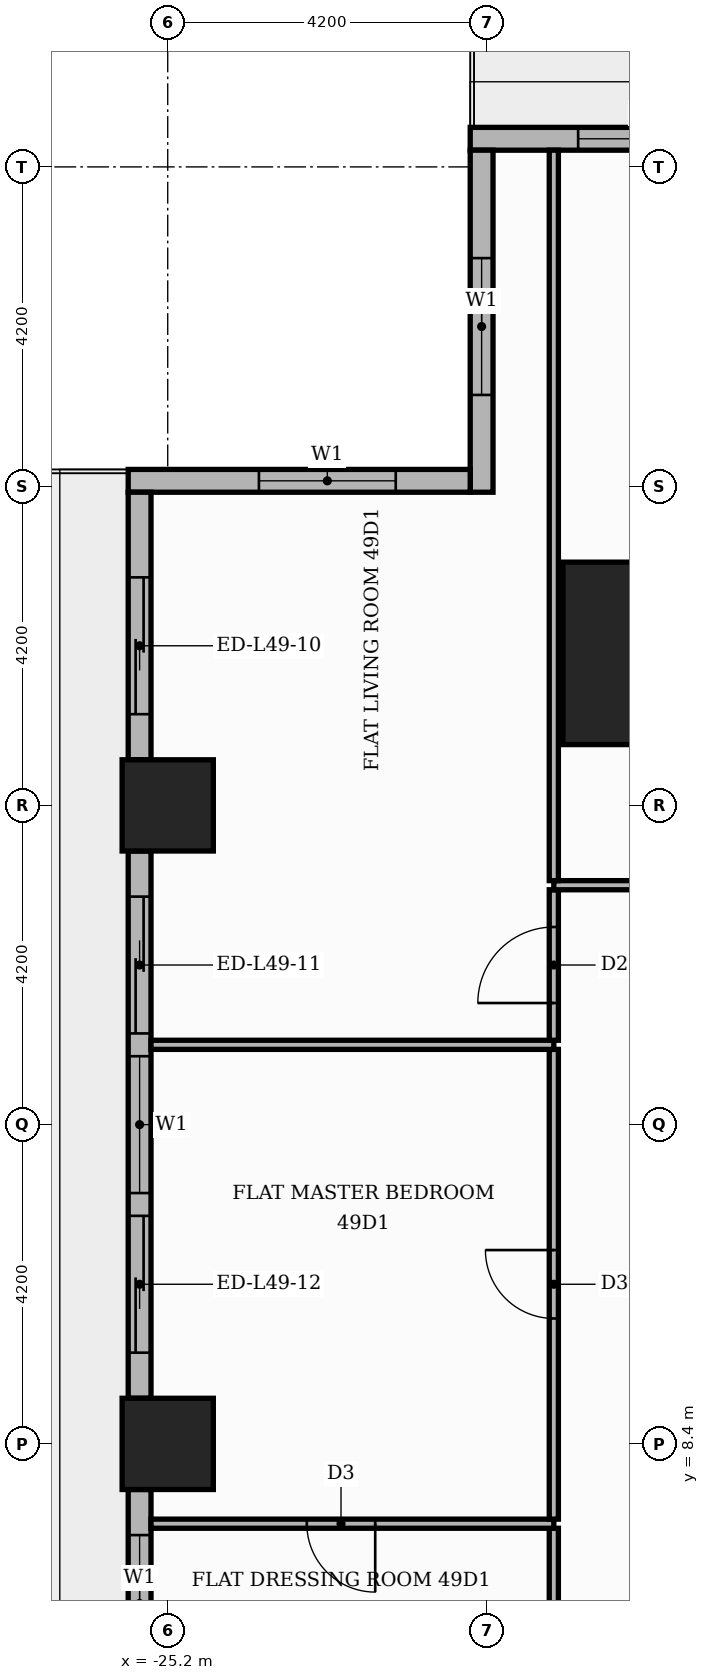
"""IFC4 building model, lengths in metres.
Left out: names, types, materials, properties, quantities, classifications, styles, units other than length and angle.
Written with IfcOpenShell. Run it as: python <this file> out.ifc"""

import sys

from ifc_helpers import new_model, si_unit, direction, frame, frame_2d, origin, origin_2d, place, context, subcontext, project, spatial, rectangle, extrude, element, fill, save


model = new_model("IFC4")
c1 = context("Model", 3, precision=1e-05, world=origin(), true_north=direction((0.0, 1.0)))
c2 = subcontext(c1, "Body", "Model", "MODEL_VIEW")
j1 = project(units=[si_unit("LENGTHUNIT", "METRE"), si_unit("PLANEANGLEUNIT", "RADIAN")], contexts=[c1])
p1 = place(None, origin())
s1 = spatial("IfcSite", under=j1, at=p1, CompositionType="ELEMENT")
p2 = place(p1, origin())
s2 = spatial("IfcBuilding", under=s1, at=p2, CompositionType="ELEMENT")
p3 = place(p2, frame((0.0, 0.0, 207.9)))
s3 = spatial("IfcBuildingStorey", under=s2, at=p3, CompositionType="ELEMENT", Elevation=207.9)
p4 = place(p3, frame((-18.8, 18.8, 0.0), z_axis=(0.0, 0.0, 1.0), x_axis=(1.0, 0.0, 0.0)))
e1 = element("IfcColumn", 1, at=p4, inside=s3, PredefinedType="COLUMN", context=c2, shape_type="SweptSolid", body=[
    extrude(rectangle(XDim=2.4, YDim=2.4, at=origin_2d()), origin(), (0.0, 0.0, 1.0), 3.9),
])
for number, where, z_axis, x_axis in (
    (2, (-25.2, 8.4, 0.0), (0.0, 0.0, 1.0), (1.0, 0.0, 0.0)),
    (3, (-25.2, 16.8, 0.0), (0.0, 0.0, 1.0), (1.0, 0.0, 0.0)),
):
    element("IfcColumn", number, at=place(p3, frame(where, z_axis=z_axis, x_axis=x_axis)), inside=s3, PredefinedType="COLUMN", context=c2, shape_type="SweptSolid", body=[
        extrude(rectangle(XDim=1.2, YDim=1.2, at=origin_2d()), origin(), (0.0, 0.0, 1.0), 3.9),
    ])
p5 = place(p3, frame((-17.4, 25.57, 0.0), z_axis=(0.0, 0.0, 1.0), x_axis=(-1.0, 0.0, 0.0)))
e4 = element("IfcWall", 4, at=p5, inside=s3, PredefinedType="STANDARD", context=c2, shape_type="SweptSolid", body=[
    extrude(rectangle(XDim=3.82, YDim=0.3, at=frame_2d((1.91, 0.0))), origin(), (0.0, 0.0, 1.0), 3.48),
])
p6 = place(p5, frame((0.6, 0.0, 0.9)))
e5 = element("IfcOpeningElement", 5, at=p6, cuts=e4, PredefinedType="OPENING", context=c2, shape_type="SweptSolid", body=[
    extrude(rectangle(XDim=1.8, YDim=2.1, at=frame_2d((0.9, 1.05))), frame((0.0, 0.16, 0.0), z_axis=(0.0, -1.0, 0.0), x_axis=(1.0, 0.0, 0.0)), (0.0, 0.0, 1.0), 0.32),
])
p7 = place(p3, frame((-21.07, 25.42, 0.0), z_axis=(0.0, 0.0, 1.0), x_axis=(0.0, -1.0, 0.0)))
e6 = element("IfcWall", 6, at=p7, inside=s3, PredefinedType="STANDARD", context=c2, shape_type="SweptSolid", body=[
    extrude(rectangle(XDim=4.5, YDim=0.3, at=frame_2d((2.25, 0.0))), origin(), (0.0, 0.0, 1.0), 3.48),
])
p8 = place(p7, frame((1.42, 0.0, 0.9)))
e7 = element("IfcOpeningElement", 7, at=p8, cuts=e6, PredefinedType="OPENING", context=c2, shape_type="SweptSolid", body=[
    extrude(rectangle(XDim=1.8, YDim=2.1, at=frame_2d((0.9, 1.05))), frame((0.0, 0.16, 0.0), z_axis=(0.0, -1.0, 0.0), x_axis=(1.0, 0.0, 0.0)), (0.0, 0.0, 1.0), 0.32),
])
p9 = place(p3, frame((-21.22, 21.07, 0.0), z_axis=(0.0, 0.0, 1.0), x_axis=(-1.0, 0.0, 0.0)))
e8 = element("IfcWall", 8, at=p9, inside=s3, PredefinedType="STANDARD", context=c2, shape_type="SweptSolid", body=[
    extrude(rectangle(XDim=4.5, YDim=0.3, at=frame_2d((2.25, 0.0))), origin(), (0.0, 0.0, 1.0), 3.48),
])
p10 = place(p9, frame((0.98, 0.0, 0.9)))
e9 = element("IfcOpeningElement", 9, at=p10, cuts=e8, PredefinedType="OPENING", context=c2, shape_type="SweptSolid", body=[
    extrude(rectangle(XDim=1.8, YDim=2.1, at=frame_2d((0.9, 1.05))), frame((0.0, 0.16, 0.0), z_axis=(0.0, -1.0, 0.0), x_axis=(1.0, 0.0, 0.0)), (0.0, 0.0, 1.0), 0.32),
])
p11 = place(p3, frame((-25.57, 20.92, 0.0), z_axis=(0.0, 0.0, 1.0), x_axis=(0.0, -1.0, 0.0)))
e10 = element("IfcWall", 10, at=p11, inside=s3, PredefinedType="STANDARD", context=c2, shape_type="SweptSolid", body=[
    extrude(rectangle(XDim=3.52, YDim=0.3, at=frame_2d((1.76, 0.0))), origin(), (0.0, 0.0, 1.0), 3.48),
])
p12 = place(p11, frame((1.12, 0.0, 0.0)))
e11 = element("IfcOpeningElement", 11, at=p12, cuts=e10, PredefinedType="OPENING", context=c2, shape_type="SweptSolid", body=[
    extrude(rectangle(XDim=1.8, YDim=2.4, at=frame_2d((0.9, 1.2))), frame((0.0, 0.16, 0.0), z_axis=(0.0, -1.0, 0.0), x_axis=(1.0, 0.0, 0.0)), (0.0, 0.0, 1.0), 0.32),
])
p13 = place(p3, frame((-25.57, 16.2, 0.0), z_axis=(0.0, 0.0, 1.0), x_axis=(0.0, -1.0, 0.0)))
e12 = element("IfcWall", 12, at=p13, inside=s3, PredefinedType="STANDARD", context=c2, shape_type="SweptSolid", body=[
    extrude(rectangle(XDim=7.2, YDim=0.3, at=frame_2d((3.6, 0.0))), origin(), (0.0, 0.0, 1.0), 3.48),
])
p14 = place(p13, frame((0.6, 0.0, 0.0)))
e13 = element("IfcOpeningElement", 13, at=p14, cuts=e12, PredefinedType="OPENING", context=c2, shape_type="SweptSolid", body=[
    extrude(rectangle(XDim=1.8, YDim=2.4, at=frame_2d((0.9, 1.2))), frame((0.0, 0.16, 0.0), z_axis=(0.0, -1.0, 0.0), x_axis=(1.0, 0.0, 0.0)), (0.0, 0.0, 1.0), 0.32),
])
p15 = place(p13, frame((2.7, 0.0, 0.9)))
e14 = element("IfcOpeningElement", 14, at=p15, cuts=e12, PredefinedType="OPENING", context=c2, shape_type="SweptSolid", body=[
    extrude(rectangle(XDim=1.8, YDim=2.1, at=frame_2d((0.9, 1.05))), frame((0.0, 0.16, 0.0), z_axis=(0.0, -1.0, 0.0), x_axis=(1.0, 0.0, 0.0)), (0.0, 0.0, 1.0), 0.32),
])
p16 = place(p13, frame((4.8, 0.0, 0.0)))
e15 = element("IfcOpeningElement", 15, at=p16, cuts=e12, PredefinedType="OPENING", context=c2, shape_type="SweptSolid", body=[
    extrude(rectangle(XDim=1.8, YDim=2.4, at=frame_2d((0.9, 1.2))), frame((0.0, 0.16, 0.0), z_axis=(0.0, -1.0, 0.0), x_axis=(1.0, 0.0, 0.0)), (0.0, 0.0, 1.0), 0.32),
])
p17 = place(p3, frame((-25.57, 7.8, 0.0), z_axis=(0.0, 0.0, 1.0), x_axis=(0.0, -1.0, 0.0)))
e16 = element("IfcWall", 16, at=p17, inside=s3, PredefinedType="STANDARD", context=c2, shape_type="SweptSolid", body=[
    extrude(rectangle(XDim=7.2, YDim=0.3, at=frame_2d((3.6, 0.0))), origin(), (0.0, 0.0, 1.0), 3.48),
])
p18 = place(p17, frame((0.6, 0.0, 0.9)))
e17 = element("IfcOpeningElement", 17, at=p18, cuts=e16, PredefinedType="OPENING", context=c2, shape_type="SweptSolid", body=[
    extrude(rectangle(XDim=1.8, YDim=2.1, at=frame_2d((0.9, 1.05))), frame((0.0, 0.16, 0.0), z_axis=(0.0, -1.0, 0.0), x_axis=(1.0, 0.0, 0.0)), (0.0, 0.0, 1.0), 0.32),
])
p19 = place(p17, frame((2.7, 0.0, 0.9)))
e18 = element("IfcOpeningElement", 18, at=p19, cuts=e16, PredefinedType="OPENING", context=c2, shape_type="SweptSolid", body=[
    extrude(rectangle(XDim=1.8, YDim=2.1, at=frame_2d((0.9, 1.05))), frame((0.0, 0.16, 0.0), z_axis=(0.0, -1.0, 0.0), x_axis=(1.0, 0.0, 0.0)), (0.0, 0.0, 1.0), 0.32),
])
p20 = place(p17, frame((4.8, 0.0, 0.9)))
e19 = element("IfcOpeningElement", 19, at=p20, cuts=e16, PredefinedType="OPENING", context=c2, shape_type="SweptSolid", body=[
    extrude(rectangle(XDim=1.8, YDim=2.1, at=frame_2d((0.9, 1.05))), frame((0.0, 0.16, 0.0), z_axis=(0.0, -1.0, 0.0), x_axis=(1.0, 0.0, 0.0)), (0.0, 0.0, 1.0), 0.32),
])
p21 = place(p3, frame((-20.12, 5.31, 0.0), z_axis=(0.0, 0.0, 1.0), x_axis=(0.0, 1.0, 0.0)))
e20 = element("IfcWall", 20, at=p21, inside=s3, PredefinedType="PARTITIONING", context=c2, shape_type="SweptSolid", body=[
    extrude(rectangle(XDim=1.98, YDim=0.12, at=frame_2d((0.99, 0.0))), origin(), (0.0, 0.0, 1.0), 3.48),
])
p22 = place(p3, frame((-25.42, 7.35, 0.0), z_axis=(0.0, 0.0, 1.0), x_axis=(1.0, 0.0, 0.0)))
e21 = element("IfcWall", 21, at=p22, inside=s3, PredefinedType="PARTITIONING", context=c2, shape_type="SweptSolid", body=[
    extrude(rectangle(XDim=5.3, YDim=0.12, at=frame_2d((2.65, 0.0))), origin(), (0.0, 0.0, 1.0), 3.48),
])
p23 = place(p22, frame((2.05, 0.0, 0.0)))
e22 = element("IfcOpeningElement", 22, at=p23, cuts=e21, PredefinedType="OPENING", context=c2, shape_type="SweptSolid", body=[
    extrude(rectangle(XDim=0.9, YDim=2.1, at=frame_2d((0.45, 1.05))), frame((0.0, 0.07, 0.0), z_axis=(0.0, -1.0, 0.0), x_axis=(1.0, 0.0, 0.0)), (0.0, 0.0, 1.0), 0.14),
])
p24 = place(p3, frame((-20.12, 7.41, 0.0), z_axis=(0.0, 0.0, 1.0), x_axis=(0.0, 1.0, 0.0)))
e23 = element("IfcWall", 23, at=p24, inside=s3, PredefinedType="PARTITIONING", context=c2, shape_type="SweptSolid", body=[
    extrude(rectangle(XDim=6.18, YDim=0.12, at=frame_2d((3.09, 0.0))), origin(), (0.0, 0.0, 1.0), 3.48),
])
p25 = place(p24, frame((2.64, 0.0, 0.0)))
e24 = element("IfcOpeningElement", 24, at=p25, cuts=e23, PredefinedType="OPENING", context=c2, shape_type="SweptSolid", body=[
    extrude(rectangle(XDim=0.9, YDim=2.1, at=frame_2d((0.45, 1.05))), frame((0.0, 0.07, 0.0), z_axis=(0.0, -1.0, 0.0), x_axis=(1.0, 0.0, 0.0)), (0.0, 0.0, 1.0), 0.14),
])
p26 = place(p3, frame((-25.42, 13.65, 0.0), z_axis=(0.0, 0.0, 1.0), x_axis=(1.0, 0.0, 0.0)))
e25 = element("IfcWall", 25, at=p26, inside=s3, PredefinedType="PARTITIONING", context=c2, shape_type="SweptSolid", body=[
    extrude(rectangle(XDim=5.3, YDim=0.12, at=frame_2d((2.65, 0.0))), origin(), (0.0, 0.0, 1.0), 3.48),
])
p27 = place(p3, frame((-20.12, 13.71, 0.0), z_axis=(0.0, 0.0, 1.0), x_axis=(0.0, 1.0, 0.0)))
e26 = element("IfcWall", 26, at=p27, inside=s3, PredefinedType="PARTITIONING", context=c2, shape_type="SweptSolid", body=[
    extrude(rectangle(XDim=1.98, YDim=0.12, at=frame_2d((0.99, 0.0))), origin(), (0.0, 0.0, 1.0), 3.48),
])
p28 = place(p27, frame((0.49, 0.0, 0.0)))
e27 = element("IfcOpeningElement", 27, at=p28, cuts=e26, PredefinedType="OPENING", context=c2, shape_type="SweptSolid", body=[
    extrude(rectangle(XDim=1.0, YDim=2.1, at=frame_2d((0.5, 1.05))), frame((0.0, 0.07, 0.0), z_axis=(0.0, -1.0, 0.0), x_axis=(1.0, 0.0, 0.0)), (0.0, 0.0, 1.0), 0.14),
])
p29 = place(p3, frame((-20.12, 15.75, 0.0), z_axis=(0.0, 0.0, 1.0), x_axis=(1.0, 0.0, 0.0)))
e28 = element("IfcWall", 28, at=p29, inside=s3, PredefinedType="PARTITIONING", context=c2, shape_type="SweptSolid", body=[
    extrude(rectangle(XDim=6.37, YDim=0.12, at=frame_2d((3.185, 0.0))), origin(), (0.0, 0.0, 1.0), 3.48),
])
p30 = place(p29, frame((2.785, 0.0, 0.0)))
e29 = element("IfcOpeningElement", 29, at=p30, cuts=e28, PredefinedType="OPENING", context=c2, shape_type="SweptSolid", body=[
    extrude(rectangle(XDim=0.9, YDim=2.1, at=frame_2d((0.45, 1.05))), frame((0.0, 0.07, 0.0), z_axis=(0.0, -1.0, 0.0), x_axis=(1.0, 0.0, 0.0)), (0.0, 0.0, 1.0), 0.14),
])
p31 = place(p3, frame((-20.12, 15.81, 0.0), z_axis=(0.0, 0.0, 1.0), x_axis=(0.0, 1.0, 0.0)))
e30 = element("IfcWall", 30, at=p31, inside=s3, PredefinedType="PARTITIONING", context=c2, shape_type="SweptSolid", body=[
    extrude(rectangle(XDim=9.61, YDim=0.12, at=frame_2d((4.805, 0.0))), origin(), (0.0, 0.0, 1.0), 3.48),
])
p32 = place(p6, origin())
e31 = element("IfcWindow", 31, at=p32, inside=s3, PartitioningType="SINGLE_PANEL", PredefinedType="WINDOW", context=c2, shape_type="SweptSolid", body=[
    extrude(rectangle(XDim=1.8, YDim=2.1, at=frame_2d((0.9, 1.05))), frame((0.0, 0.03, 0.0), z_axis=(0.0, -1.0, 0.0), x_axis=(1.0, 0.0, 0.0)), (0.0, 0.0, 1.0), 0.06),
])
fill(e5, e31)
p33 = place(p8, origin())
e32 = element("IfcWindow", 32, at=p33, inside=s3, PartitioningType="SINGLE_PANEL", PredefinedType="WINDOW", context=c2, shape_type="SweptSolid", body=[
    extrude(rectangle(XDim=1.8, YDim=2.1, at=frame_2d((0.9, 1.05))), frame((0.0, 0.03, 0.0), z_axis=(0.0, -1.0, 0.0), x_axis=(1.0, 0.0, 0.0)), (0.0, 0.0, 1.0), 0.06),
])
fill(e7, e32)
p34 = place(p10, origin())
e33 = element("IfcWindow", 33, at=p34, inside=s3, PartitioningType="SINGLE_PANEL", PredefinedType="WINDOW", context=c2, shape_type="SweptSolid", body=[
    extrude(rectangle(XDim=1.8, YDim=2.1, at=frame_2d((0.9, 1.05))), frame((0.0, 0.03, 0.0), z_axis=(0.0, -1.0, 0.0), x_axis=(1.0, 0.0, 0.0)), (0.0, 0.0, 1.0), 0.06),
])
fill(e9, e33)
p35 = place(p12, origin())
e34 = element("IfcDoor", 34, at=p35, inside=s3, OperationType="SLIDING_TO_RIGHT", PredefinedType="DOOR", context=c2, shape_type="SweptSolid", body=[
    extrude(rectangle(XDim=1.8, YDim=2.4, at=frame_2d((0.9, 1.2))), frame((0.0, 0.025, 0.0), z_axis=(0.0, -1.0, 0.0), x_axis=(1.0, 0.0, 0.0)), (0.0, 0.0, 1.0), 0.05),
])
fill(e11, e34)
p36 = place(p14, origin())
e35 = element("IfcDoor", 35, at=p36, inside=s3, OperationType="SLIDING_TO_LEFT", PredefinedType="DOOR", context=c2, shape_type="SweptSolid", body=[
    extrude(rectangle(XDim=1.8, YDim=2.4, at=frame_2d((0.9, 1.2))), frame((0.0, 0.025, 0.0), z_axis=(0.0, -1.0, 0.0), x_axis=(1.0, 0.0, 0.0)), (0.0, 0.0, 1.0), 0.05),
])
fill(e13, e35)
p37 = place(p15, origin())
e36 = element("IfcWindow", 36, at=p37, inside=s3, PartitioningType="SINGLE_PANEL", PredefinedType="WINDOW", context=c2, shape_type="SweptSolid", body=[
    extrude(rectangle(XDim=1.8, YDim=2.1, at=frame_2d((0.9, 1.05))), frame((0.0, 0.03, 0.0), z_axis=(0.0, -1.0, 0.0), x_axis=(1.0, 0.0, 0.0)), (0.0, 0.0, 1.0), 0.06),
])
fill(e14, e36)
p38 = place(p16, origin())
e37 = element("IfcDoor", 37, at=p38, inside=s3, OperationType="SLIDING_TO_RIGHT", PredefinedType="DOOR", context=c2, shape_type="SweptSolid", body=[
    extrude(rectangle(XDim=1.8, YDim=2.4, at=frame_2d((0.9, 1.2))), frame((0.0, 0.025, 0.0), z_axis=(0.0, -1.0, 0.0), x_axis=(1.0, 0.0, 0.0)), (0.0, 0.0, 1.0), 0.05),
])
fill(e15, e37)
p39 = place(p18, origin())
e38 = element("IfcWindow", 38, at=p39, inside=s3, PartitioningType="SINGLE_PANEL", PredefinedType="WINDOW", context=c2, shape_type="SweptSolid", body=[
    extrude(rectangle(XDim=1.8, YDim=2.1, at=frame_2d((0.9, 1.05))), frame((0.0, 0.03, 0.0), z_axis=(0.0, -1.0, 0.0), x_axis=(1.0, 0.0, 0.0)), (0.0, 0.0, 1.0), 0.06),
])
fill(e17, e38)
p40 = place(p28, origin())
e39 = element("IfcDoor", 39, at=p40, inside=s3, OperationType="SINGLE_SWING_LEFT", PredefinedType="DOOR", context=c2, shape_type="SweptSolid", body=[
    extrude(rectangle(XDim=1.0, YDim=2.1, at=frame_2d((0.5, 1.05))), frame((0.0, 0.025, 0.0), z_axis=(0.0, -1.0, 0.0), x_axis=(1.0, 0.0, 0.0)), (0.0, 0.0, 1.0), 0.05),
])
fill(e27, e39)
p41 = place(p25, origin())
e40 = element("IfcDoor", 40, at=p41, inside=s3, OperationType="SINGLE_SWING_RIGHT", PredefinedType="DOOR", context=c2, shape_type="SweptSolid", body=[
    extrude(rectangle(XDim=0.9, YDim=2.1, at=frame_2d((0.45, 1.05))), frame((0.0, 0.025, 0.0), z_axis=(0.0, -1.0, 0.0), x_axis=(1.0, 0.0, 0.0)), (0.0, 0.0, 1.0), 0.05),
])
fill(e24, e40)
p42 = place(p23, frame((0.9, 0.0, 0.0), z_axis=(0.0, 0.0, 1.0), x_axis=(-1.0, 0.0, 0.0)))
e41 = element("IfcDoor", 41, at=p42, inside=s3, OperationType="SINGLE_SWING_RIGHT", PredefinedType="DOOR", context=c2, shape_type="SweptSolid", body=[
    extrude(rectangle(XDim=0.9, YDim=2.1, at=frame_2d((0.45, 1.05))), frame((0.0, 0.025, 0.0), z_axis=(0.0, -1.0, 0.0), x_axis=(1.0, 0.0, 0.0)), (0.0, 0.0, 1.0), 0.05),
])
fill(e22, e41)
save(model, sys.argv[1])
